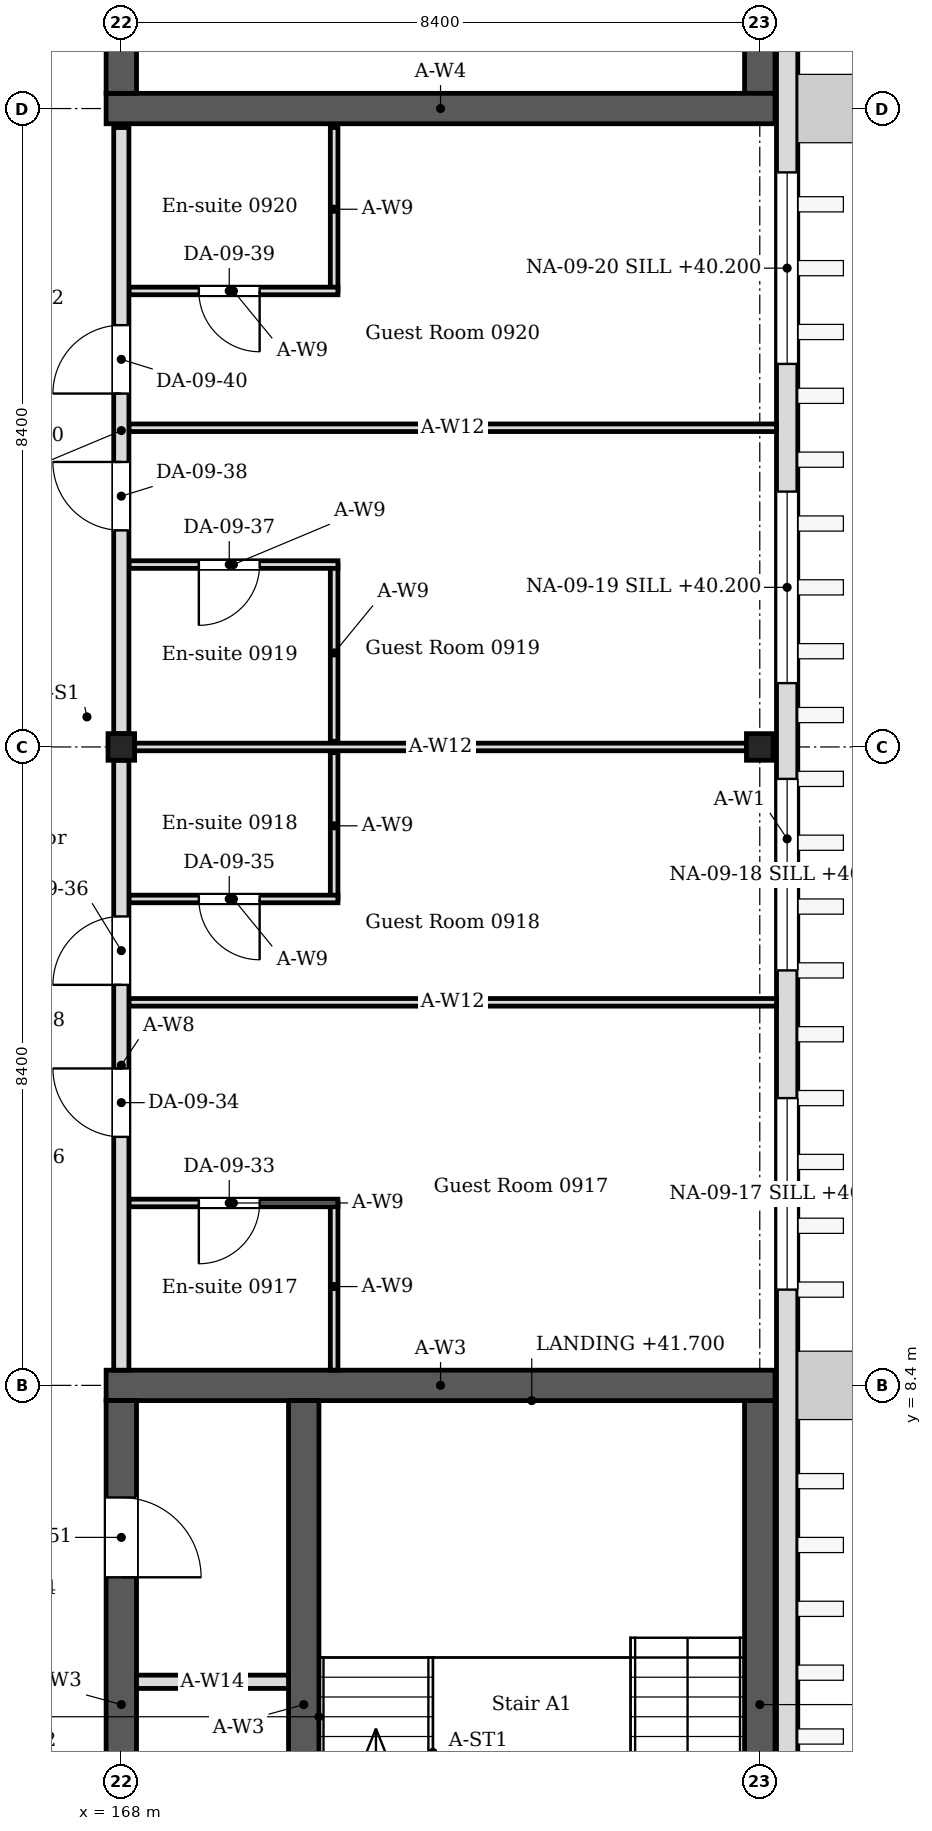
"""IFC4 building model, lengths in metres.
Left out: names, types, materials, properties, quantities, classifications, styles, units other than length and angle.
Written with IfcOpenShell. Run it as: python <this file> out.ifc"""

import sys

from ifc_helpers import new_model, si_unit, direction, frame, frame_2d, origin, origin_2d, place, context, subcontext, project, spatial, rectangle, i_section, extrude, element, fill, save


model = new_model("IFC4")
c1 = context("Model", 3, precision=1e-05, world=origin(), true_north=direction((0.0, 1.0)))
c2 = subcontext(c1, "Body", "Model", "MODEL_VIEW")
j1 = project(units=[si_unit("LENGTHUNIT", "METRE"), si_unit("PLANEANGLEUNIT", "RADIAN")], contexts=[c1])
p1 = place(None, origin())
s1 = spatial("IfcSite", under=j1, at=p1, CompositionType="ELEMENT")
p2 = place(p1, origin())
s2 = spatial("IfcBuilding", under=s1, at=p2, CompositionType="ELEMENT")
p3 = place(p2, frame((0.0, 0.0, 39.6)))
s3 = spatial("IfcBuildingStorey", under=s2, at=p3, CompositionType="ELEMENT", Elevation=39.6)
for number, where, z_axis, x_axis in (
    (1, (168.0, 16.8, 0.0), (0.0, 0.0, 1.0), (1.0, 0.0, 0.0)),
    (2, (176.4, 16.8, 0.0), (0.0, 0.0, 1.0), (1.0, 0.0, 0.0)),
):
    element("IfcColumn", number, at=place(p3, frame(where, z_axis=z_axis, x_axis=x_axis)), inside=s3, PredefinedType="COLUMN", context=c2, shape_type="SweptSolid", body=[
        extrude(i_section(OverallWidth=0.35, OverallDepth=0.35, WebThickness=0.012, FlangeThickness=0.019, FilletRadius=0.013, at=origin_2d()), origin(), (0.0, 0.0, 1.0), 4.2),
    ])
p4 = place(p3, frame((167.8, 8.4, 0.0), z_axis=(0.0, 0.0, 1.0), x_axis=(1.0, 0.0, 0.0)))
e3 = element("IfcWall", 3, at=p4, inside=s3, PredefinedType="SOLIDWALL", context=c2, shape_type="SweptSolid", body=[
    extrude(rectangle(XDim=8.8, YDim=0.4, at=frame_2d((4.4, 0.0))), origin(), (0.0, 0.0, 1.0), 4.05),
])
p5 = place(p3, frame((168.0, 0.2, 0.0), z_axis=(0.0, 0.0, 1.0), x_axis=(0.0, 1.0, 0.0)))
e4 = element("IfcWall", 4, at=p5, inside=s3, PredefinedType="SOLIDWALL", context=c2, shape_type="SweptSolid", body=[
    extrude(rectangle(XDim=8.0, YDim=0.4, at=frame_2d((4.0, 0.0))), origin(), (0.0, 0.0, 1.0), 4.05),
])
p6 = place(p5, frame((1.75, 0.0, 0.0)))
e5 = element("IfcOpeningElement", 5, at=p6, cuts=e4, PredefinedType="OPENING", context=c2, shape_type="SweptSolid", body=[
    extrude(rectangle(XDim=1.0, YDim=2.1, at=frame_2d((0.5, 1.05))), frame((0.0, 0.21, 0.0), z_axis=(0.0, -1.0, 0.0), x_axis=(1.0, 0.0, 0.0)), (0.0, 0.0, 1.0), 0.42),
])
p7 = place(p5, frame((5.675, 0.0, 0.0)))
e6 = element("IfcOpeningElement", 6, at=p7, cuts=e4, PredefinedType="OPENING", context=c2, shape_type="SweptSolid", body=[
    extrude(rectangle(XDim=1.05, YDim=2.1, at=frame_2d((0.525, 1.05))), frame((0.0, 0.21, 0.0), z_axis=(0.0, -1.0, 0.0), x_axis=(1.0, 0.0, 0.0)), (0.0, 0.0, 1.0), 0.42),
])
p8 = place(p3, frame((176.4, 0.2, 0.0), z_axis=(0.0, 0.0, 1.0), x_axis=(0.0, 1.0, 0.0)))
e7 = element("IfcWall", 7, at=p8, inside=s3, PredefinedType="SOLIDWALL", context=c2, shape_type="SweptSolid", body=[
    extrude(rectangle(XDim=8.0, YDim=0.4, at=frame_2d((4.0, 0.0))), origin(), (0.0, 0.0, 1.0), 4.05),
])
p9 = place(p3, frame((167.8, 25.2, 0.0), z_axis=(0.0, 0.0, 1.0), x_axis=(1.0, 0.0, 0.0)))
e8 = element("IfcWall", 8, at=p9, inside=s3, PredefinedType="SOLIDWALL", context=c2, shape_type="SweptSolid", body=[
    extrude(rectangle(XDim=8.8, YDim=0.4, at=frame_2d((4.4, 0.0))), origin(), (0.0, 0.0, 1.0), 4.05),
])
p10 = place(p3, frame((168.0, 25.4, 0.0), z_axis=(0.0, 0.0, 1.0), x_axis=(0.0, 1.0, 0.0)))
e9 = element("IfcWall", 9, at=p10, inside=s3, PredefinedType="SOLIDWALL", context=c2, shape_type="SweptSolid", body=[
    extrude(rectangle(XDim=16.4, YDim=0.4, at=frame_2d((8.2, 0.0))), origin(), (0.0, 0.0, 1.0), 4.05),
])
p11 = place(p10, frame((1.0, 0.0, 0.0)))
e10 = element("IfcOpeningElement", 10, at=p11, cuts=e9, PredefinedType="OPENING", context=c2, shape_type="SweptSolid", body=[
    extrude(rectangle(XDim=1.0, YDim=2.1, at=frame_2d((0.5, 1.05))), frame((0.0, 0.21, 0.0), z_axis=(0.0, -1.0, 0.0), x_axis=(1.0, 0.0, 0.0)), (0.0, 0.0, 1.0), 0.42),
])
p12 = place(p10, frame((14.4, 0.0, 0.0)))
e11 = element("IfcOpeningElement", 11, at=p12, cuts=e9, PredefinedType="OPENING", context=c2, shape_type="SweptSolid", body=[
    extrude(rectangle(XDim=1.4, YDim=2.1, at=frame_2d((0.7, 1.05))), frame((0.0, 0.21, 0.0), z_axis=(0.0, -1.0, 0.0), x_axis=(1.0, 0.0, 0.0)), (0.0, 0.0, 1.0), 0.42),
])
p13 = place(p3, frame((176.4, 25.4, 0.0), z_axis=(0.0, 0.0, 1.0), x_axis=(0.0, 1.0, 0.0)))
e12 = element("IfcWall", 12, at=p13, inside=s3, PredefinedType="SOLIDWALL", context=c2, shape_type="SweptSolid", body=[
    extrude(rectangle(XDim=16.4, YDim=0.4, at=frame_2d((8.2, 0.0))), origin(), (0.0, 0.0, 1.0), 4.05),
])
p14 = place(p3, frame((176.76, -0.22, 0.0), z_axis=(0.0, 0.0, 1.0), x_axis=(0.0, 1.0, 0.0)))
e13 = element("IfcWall", 13, at=p14, inside=s3, PredefinedType="SOLIDWALL", context=c2, shape_type="SweptSolid", body=[
    extrude(rectangle(XDim=42.57, YDim=0.28, at=frame_2d((21.285, 0.0))), origin(), (0.0, 0.0, 1.0), 4.05),
])
p15 = place(p14, frame((9.88, 0.0, 0.6)))
e14 = element("IfcOpeningElement", 14, at=p15, cuts=e13, PredefinedType="OPENING", context=c2, shape_type="SweptSolid", body=[
    extrude(rectangle(XDim=2.52, YDim=2.4, at=frame_2d((1.26, 1.2))), frame((0.0, 0.15, 0.0), z_axis=(0.0, -1.0, 0.0), x_axis=(1.0, 0.0, 0.0)), (0.0, 0.0, 1.0), 0.3),
])
p16 = place(p14, frame((14.08, 0.0, 0.6)))
e15 = element("IfcOpeningElement", 15, at=p16, cuts=e13, PredefinedType="OPENING", context=c2, shape_type="SweptSolid", body=[
    extrude(rectangle(XDim=2.52, YDim=2.4, at=frame_2d((1.26, 1.2))), frame((0.0, 0.15, 0.0), z_axis=(0.0, -1.0, 0.0), x_axis=(1.0, 0.0, 0.0)), (0.0, 0.0, 1.0), 0.3),
])
p17 = place(p14, frame((17.86, 0.0, 0.6)))
e16 = element("IfcOpeningElement", 16, at=p17, cuts=e13, PredefinedType="OPENING", context=c2, shape_type="SweptSolid", body=[
    extrude(rectangle(XDim=2.52, YDim=2.4, at=frame_2d((1.26, 1.2))), frame((0.0, 0.15, 0.0), z_axis=(0.0, -1.0, 0.0), x_axis=(1.0, 0.0, 0.0)), (0.0, 0.0, 1.0), 0.3),
])
p18 = place(p14, frame((22.06, 0.0, 0.6)))
e17 = element("IfcOpeningElement", 17, at=p18, cuts=e13, PredefinedType="OPENING", context=c2, shape_type="SweptSolid", body=[
    extrude(rectangle(XDim=2.52, YDim=2.4, at=frame_2d((1.26, 1.2))), frame((0.0, 0.15, 0.0), z_axis=(0.0, -1.0, 0.0), x_axis=(1.0, 0.0, 0.0)), (0.0, 0.0, 1.0), 0.3),
])
p19 = place(p3, frame((170.8, 8.6, 0.0), z_axis=(0.0, 0.0, 1.0), x_axis=(0.0, 1.0, 0.0)))
e18 = element("IfcWall", 18, at=p19, inside=s3, PredefinedType="PARTITIONING", context=c2, shape_type="SweptSolid", body=[
    extrude(rectangle(XDim=2.2, YDim=0.1, at=frame_2d((1.1, 0.0))), origin(), (0.0, 0.0, 1.0), 4.05),
])
p20 = place(p3, frame((170.85, 10.8, 0.0), z_axis=(0.0, 0.0, 1.0), x_axis=(-1.0, 0.0, 0.0)))
e19 = element("IfcWall", 19, at=p20, inside=s3, PredefinedType="PARTITIONING", context=c2, shape_type="SweptSolid", body=[
    extrude(rectangle(XDim=2.75, YDim=0.1, at=frame_2d((1.375, 0.0))), origin(), (0.0, 0.0, 1.0), 4.05),
])
p21 = place(p20, frame((1.03, 0.0, 0.0)))
e20 = element("IfcOpeningElement", 20, at=p21, cuts=e19, PredefinedType="OPENING", context=c2, shape_type="SweptSolid", body=[
    extrude(rectangle(XDim=0.8, YDim=2.1, at=frame_2d((0.4, 1.05))), frame((0.0, 0.06, 0.0), z_axis=(0.0, -1.0, 0.0), x_axis=(1.0, 0.0, 0.0)), (0.0, 0.0, 1.0), 0.12),
])
p22 = place(p3, frame((170.8, 14.8, 0.0), z_axis=(0.0, 0.0, 1.0), x_axis=(0.0, 1.0, 0.0)))
e21 = element("IfcWall", 21, at=p22, inside=s3, PredefinedType="PARTITIONING", context=c2, shape_type="SweptSolid", body=[
    extrude(rectangle(XDim=1.925, YDim=0.1, at=frame_2d((0.962, 0.0))), origin(), (0.0, 0.0, 1.0), 4.05),
])
p23 = place(p3, frame((170.85, 14.8, 0.0), z_axis=(0.0, 0.0, 1.0), x_axis=(-1.0, 0.0, 0.0)))
e22 = element("IfcWall", 22, at=p23, inside=s3, PredefinedType="PARTITIONING", context=c2, shape_type="SweptSolid", body=[
    extrude(rectangle(XDim=2.75, YDim=0.1, at=frame_2d((1.375, 0.0))), origin(), (0.0, 0.0, 1.0), 4.05),
])
p24 = place(p23, frame((1.03, 0.0, 0.0)))
e23 = element("IfcOpeningElement", 23, at=p24, cuts=e22, PredefinedType="OPENING", context=c2, shape_type="SweptSolid", body=[
    extrude(rectangle(XDim=0.8, YDim=2.1, at=frame_2d((0.4, 1.05))), frame((0.0, 0.06, 0.0), z_axis=(0.0, -1.0, 0.0), x_axis=(1.0, 0.0, 0.0)), (0.0, 0.0, 1.0), 0.12),
])
p25 = place(p3, frame((170.8, 16.875, 0.0), z_axis=(0.0, 0.0, 1.0), x_axis=(0.0, 1.0, 0.0)))
e24 = element("IfcWall", 24, at=p25, inside=s3, PredefinedType="PARTITIONING", context=c2, shape_type="SweptSolid", body=[
    extrude(rectangle(XDim=2.325, YDim=0.1, at=frame_2d((1.163, 0.0))), origin(), (0.0, 0.0, 1.0), 4.05),
])
p26 = place(p3, frame((170.85, 19.2, 0.0), z_axis=(0.0, 0.0, 1.0), x_axis=(-1.0, 0.0, 0.0)))
e25 = element("IfcWall", 25, at=p26, inside=s3, PredefinedType="PARTITIONING", context=c2, shape_type="SweptSolid", body=[
    extrude(rectangle(XDim=2.75, YDim=0.1, at=frame_2d((1.375, 0.0))), origin(), (0.0, 0.0, 1.0), 4.05),
])
p27 = place(p26, frame((1.03, 0.0, 0.0)))
e26 = element("IfcOpeningElement", 26, at=p27, cuts=e25, PredefinedType="OPENING", context=c2, shape_type="SweptSolid", body=[
    extrude(rectangle(XDim=0.8, YDim=2.1, at=frame_2d((0.4, 1.05))), frame((0.0, 0.06, 0.0), z_axis=(0.0, -1.0, 0.0), x_axis=(1.0, 0.0, 0.0)), (0.0, 0.0, 1.0), 0.12),
])
p28 = place(p3, frame((170.8, 22.8, 0.0), z_axis=(0.0, 0.0, 1.0), x_axis=(0.0, 1.0, 0.0)))
e27 = element("IfcWall", 27, at=p28, inside=s3, PredefinedType="PARTITIONING", context=c2, shape_type="SweptSolid", body=[
    extrude(rectangle(XDim=2.15, YDim=0.1, at=frame_2d((1.075, 0.0))), origin(), (0.0, 0.0, 1.0), 4.05),
])
p29 = place(p3, frame((170.85, 22.8, 0.0), z_axis=(0.0, 0.0, 1.0), x_axis=(-1.0, 0.0, 0.0)))
e28 = element("IfcWall", 28, at=p29, inside=s3, PredefinedType="PARTITIONING", context=c2, shape_type="SweptSolid", body=[
    extrude(rectangle(XDim=2.75, YDim=0.1, at=frame_2d((1.375, 0.0))), origin(), (0.0, 0.0, 1.0), 4.05),
])
p30 = place(p29, frame((1.03, 0.0, 0.0)))
e29 = element("IfcOpeningElement", 29, at=p30, cuts=e28, PredefinedType="OPENING", context=c2, shape_type="SweptSolid", body=[
    extrude(rectangle(XDim=0.8, YDim=2.1, at=frame_2d((0.4, 1.05))), frame((0.0, 0.06, 0.0), z_axis=(0.0, -1.0, 0.0), x_axis=(1.0, 0.0, 0.0)), (0.0, 0.0, 1.0), 0.12),
])
p31 = place(p3, frame((168.175, 16.8, 0.0), z_axis=(0.0, 0.0, 1.0), x_axis=(1.0, 0.0, 0.0)))
e30 = element("IfcWall", 30, at=p31, inside=s3, PredefinedType="PARTITIONING", context=c2, shape_type="SweptSolid", body=[
    extrude(rectangle(XDim=8.05, YDim=0.1, at=frame_2d((4.025, 0.0))), origin(), (0.0, 0.0, 1.0), 3.604),
])
for number, where, z_axis, x_axis in (
    (31, (168.1, 13.44, 0.0), (0.0, 0.0, 1.0), (1.0, 0.0, 0.0)),
    (32, (168.1, 21.0, 0.0), (0.0, 0.0, 1.0), (1.0, 0.0, 0.0)),
):
    element("IfcWall", number, at=place(p3, frame(where, z_axis=z_axis, x_axis=x_axis)), inside=s3, PredefinedType="PARTITIONING", context=c2, shape_type="SweptSolid", body=[
        extrude(rectangle(XDim=8.52, YDim=0.1, at=frame_2d((4.26, 0.0))), origin(), (0.0, 0.0, 1.0), 3.604),
    ])
p32 = place(p3, frame((168.0, 8.6, 0.0), z_axis=(0.0, 0.0, 1.0), x_axis=(0.0, 1.0, 0.0)))
e33 = element("IfcWall", 33, at=p32, inside=s3, PredefinedType="PARTITIONING", context=c2, shape_type="SweptSolid", body=[
    extrude(rectangle(XDim=8.025, YDim=0.2, at=frame_2d((4.012, 0.0))), origin(), (0.0, 0.0, 1.0), 3.45),
])
p33 = place(p32, frame((3.07, 0.0, 0.0)))
e34 = element("IfcOpeningElement", 34, at=p33, cuts=e33, PredefinedType="OPENING", context=c2, shape_type="SweptSolid", body=[
    extrude(rectangle(XDim=0.9, YDim=2.1, at=frame_2d((0.45, 1.05))), frame((0.0, 0.11, 0.0), z_axis=(0.0, -1.0, 0.0), x_axis=(1.0, 0.0, 0.0)), (0.0, 0.0, 1.0), 0.22),
])
p34 = place(p32, frame((5.07, 0.0, 0.0)))
e35 = element("IfcOpeningElement", 35, at=p34, cuts=e33, PredefinedType="OPENING", context=c2, shape_type="SweptSolid", body=[
    extrude(rectangle(XDim=0.9, YDim=2.1, at=frame_2d((0.45, 1.05))), frame((0.0, 0.11, 0.0), z_axis=(0.0, -1.0, 0.0), x_axis=(1.0, 0.0, 0.0)), (0.0, 0.0, 1.0), 0.22),
])
p35 = place(p3, frame((168.0, 16.975, 0.0), z_axis=(0.0, 0.0, 1.0), x_axis=(0.0, 1.0, 0.0)))
e36 = element("IfcWall", 36, at=p35, inside=s3, PredefinedType="PARTITIONING", context=c2, shape_type="SweptSolid", body=[
    extrude(rectangle(XDim=7.975, YDim=0.2, at=frame_2d((3.987, 0.0))), origin(), (0.0, 0.0, 1.0), 3.45),
])
p36 = place(p35, frame((2.675, 0.0, 0.0)))
e37 = element("IfcOpeningElement", 37, at=p36, cuts=e36, PredefinedType="OPENING", context=c2, shape_type="SweptSolid", body=[
    extrude(rectangle(XDim=0.9, YDim=2.1, at=frame_2d((0.45, 1.05))), frame((0.0, 0.11, 0.0), z_axis=(0.0, -1.0, 0.0), x_axis=(1.0, 0.0, 0.0)), (0.0, 0.0, 1.0), 0.22),
])
p37 = place(p35, frame((4.475, 0.0, 0.0)))
e38 = element("IfcOpeningElement", 38, at=p37, cuts=e36, PredefinedType="OPENING", context=c2, shape_type="SweptSolid", body=[
    extrude(rectangle(XDim=0.9, YDim=2.1, at=frame_2d((0.45, 1.05))), frame((0.0, 0.11, 0.0), z_axis=(0.0, -1.0, 0.0), x_axis=(1.0, 0.0, 0.0)), (0.0, 0.0, 1.0), 0.22),
])
p38 = place(p3, frame((170.4, 0.2, 0.0), z_axis=(0.0, 0.0, 1.0), x_axis=(0.0, 1.0, 0.0)))
e39 = element("IfcWall", 39, at=p38, inside=s3, PredefinedType="SOLIDWALL", context=c2, shape_type="SweptSolid", body=[
    extrude(rectangle(XDim=8.0, YDim=0.4, at=frame_2d((4.0, 0.0))), origin(), (0.0, 0.0, 1.0), 4.05),
])
p39 = place(p38, frame((0.3, 0.0, 0.0)))
e40 = element("IfcOpeningElement", 40, at=p39, cuts=e39, PredefinedType="OPENING", context=c2, shape_type="SweptSolid", body=[
    extrude(rectangle(XDim=0.9, YDim=2.1, at=frame_2d((0.45, 1.05))), frame((0.0, 0.21, 0.0), z_axis=(0.0, -1.0, 0.0), x_axis=(1.0, 0.0, 0.0)), (0.0, 0.0, 1.0), 0.42),
])
p40 = place(p3, frame((168.2, 4.5, 0.0), z_axis=(0.0, 0.0, 1.0), x_axis=(1.0, 0.0, 0.0)))
e41 = element("IfcWall", 41, at=p40, inside=s3, PredefinedType="PARTITIONING", context=c2, shape_type="SweptSolid", body=[
    extrude(rectangle(XDim=2.0, YDim=0.175, at=frame_2d((1.0, 0.0))), origin(), (0.0, 0.0, 1.0), 4.05),
])
p41 = place(p15, origin())
e42 = element("IfcWindow", 42, at=p41, inside=s3, PartitioningType="SINGLE_PANEL", PredefinedType="WINDOW", context=c2, shape_type="SweptSolid", body=[
    extrude(rectangle(XDim=2.52, YDim=2.4, at=frame_2d((1.26, 1.2))), frame((0.0, 0.03, 0.0), z_axis=(0.0, -1.0, 0.0), x_axis=(1.0, 0.0, 0.0)), (0.0, 0.0, 1.0), 0.06),
])
fill(e14, e42)
p42 = place(p16, origin())
e43 = element("IfcWindow", 43, at=p42, inside=s3, PartitioningType="SINGLE_PANEL", PredefinedType="WINDOW", context=c2, shape_type="SweptSolid", body=[
    extrude(rectangle(XDim=2.52, YDim=2.4, at=frame_2d((1.26, 1.2))), frame((0.0, 0.03, 0.0), z_axis=(0.0, -1.0, 0.0), x_axis=(1.0, 0.0, 0.0)), (0.0, 0.0, 1.0), 0.06),
])
fill(e15, e43)
p43 = place(p17, origin())
e44 = element("IfcWindow", 44, at=p43, inside=s3, PartitioningType="SINGLE_PANEL", PredefinedType="WINDOW", context=c2, shape_type="SweptSolid", body=[
    extrude(rectangle(XDim=2.52, YDim=2.4, at=frame_2d((1.26, 1.2))), frame((0.0, 0.03, 0.0), z_axis=(0.0, -1.0, 0.0), x_axis=(1.0, 0.0, 0.0)), (0.0, 0.0, 1.0), 0.06),
])
fill(e16, e44)
p44 = place(p18, origin())
e45 = element("IfcWindow", 45, at=p44, inside=s3, PartitioningType="SINGLE_PANEL", PredefinedType="WINDOW", context=c2, shape_type="SweptSolid", body=[
    extrude(rectangle(XDim=2.52, YDim=2.4, at=frame_2d((1.26, 1.2))), frame((0.0, 0.03, 0.0), z_axis=(0.0, -1.0, 0.0), x_axis=(1.0, 0.0, 0.0)), (0.0, 0.0, 1.0), 0.06),
])
fill(e17, e45)
p45 = place(p21, origin())
e46 = element("IfcDoor", 46, at=p45, inside=s3, OperationType="SINGLE_SWING_RIGHT", PredefinedType="DOOR", context=c2, shape_type="SweptSolid", body=[
    extrude(rectangle(XDim=0.8, YDim=2.1, at=frame_2d((0.4, 1.05))), frame((0.0, 0.025, 0.0), z_axis=(0.0, -1.0, 0.0), x_axis=(1.0, 0.0, 0.0)), (0.0, 0.0, 1.0), 0.05),
])
fill(e20, e46)
p46 = place(p33, origin())
e47 = element("IfcDoor", 47, at=p46, inside=s3, OperationType="SINGLE_SWING_RIGHT", PredefinedType="DOOR", context=c2, shape_type="SweptSolid", body=[
    extrude(rectangle(XDim=0.9, YDim=2.1, at=frame_2d((0.45, 1.05))), frame((0.0, 0.025, 0.0), z_axis=(0.0, -1.0, 0.0), x_axis=(1.0, 0.0, 0.0)), (0.0, 0.0, 1.0), 0.05),
])
fill(e34, e47)
p47 = place(p24, origin())
e48 = element("IfcDoor", 48, at=p47, inside=s3, OperationType="SINGLE_SWING_LEFT", PredefinedType="DOOR", context=c2, shape_type="SweptSolid", body=[
    extrude(rectangle(XDim=0.8, YDim=2.1, at=frame_2d((0.4, 1.05))), frame((0.0, 0.025, 0.0), z_axis=(0.0, -1.0, 0.0), x_axis=(1.0, 0.0, 0.0)), (0.0, 0.0, 1.0), 0.05),
])
fill(e23, e48)
p48 = place(p34, origin())
e49 = element("IfcDoor", 49, at=p48, inside=s3, OperationType="SINGLE_SWING_LEFT", PredefinedType="DOOR", context=c2, shape_type="SweptSolid", body=[
    extrude(rectangle(XDim=0.9, YDim=2.1, at=frame_2d((0.45, 1.05))), frame((0.0, 0.025, 0.0), z_axis=(0.0, -1.0, 0.0), x_axis=(1.0, 0.0, 0.0)), (0.0, 0.0, 1.0), 0.05),
])
fill(e35, e49)
p49 = place(p27, origin())
e50 = element("IfcDoor", 50, at=p49, inside=s3, OperationType="SINGLE_SWING_RIGHT", PredefinedType="DOOR", context=c2, shape_type="SweptSolid", body=[
    extrude(rectangle(XDim=0.8, YDim=2.1, at=frame_2d((0.4, 1.05))), frame((0.0, 0.025, 0.0), z_axis=(0.0, -1.0, 0.0), x_axis=(1.0, 0.0, 0.0)), (0.0, 0.0, 1.0), 0.05),
])
fill(e26, e50)
p50 = place(p36, origin())
e51 = element("IfcDoor", 51, at=p50, inside=s3, OperationType="SINGLE_SWING_RIGHT", PredefinedType="DOOR", context=c2, shape_type="SweptSolid", body=[
    extrude(rectangle(XDim=0.9, YDim=2.1, at=frame_2d((0.45, 1.05))), frame((0.0, 0.025, 0.0), z_axis=(0.0, -1.0, 0.0), x_axis=(1.0, 0.0, 0.0)), (0.0, 0.0, 1.0), 0.05),
])
fill(e37, e51)
p51 = place(p30, origin())
e52 = element("IfcDoor", 52, at=p51, inside=s3, OperationType="SINGLE_SWING_LEFT", PredefinedType="DOOR", context=c2, shape_type="SweptSolid", body=[
    extrude(rectangle(XDim=0.8, YDim=2.1, at=frame_2d((0.4, 1.05))), frame((0.0, 0.025, 0.0), z_axis=(0.0, -1.0, 0.0), x_axis=(1.0, 0.0, 0.0)), (0.0, 0.0, 1.0), 0.05),
])
fill(e29, e52)
p52 = place(p37, origin())
e53 = element("IfcDoor", 53, at=p52, inside=s3, OperationType="SINGLE_SWING_LEFT", PredefinedType="DOOR", context=c2, shape_type="SweptSolid", body=[
    extrude(rectangle(XDim=0.9, YDim=2.1, at=frame_2d((0.45, 1.05))), frame((0.0, 0.025, 0.0), z_axis=(0.0, -1.0, 0.0), x_axis=(1.0, 0.0, 0.0)), (0.0, 0.0, 1.0), 0.05),
])
fill(e38, e53)
p53 = place(p7, origin())
e54 = element("IfcDoor", 54, at=p53, inside=s3, OperationType="SINGLE_SWING_LEFT", PredefinedType="DOOR", context=c2, shape_type="SweptSolid", body=[
    extrude(rectangle(XDim=1.05, YDim=2.1, at=frame_2d((0.525, 1.05))), frame((0.0, 0.025, 0.0), z_axis=(0.0, -1.0, 0.0), x_axis=(1.0, 0.0, 0.0)), (0.0, 0.0, 1.0), 0.05),
])
fill(e6, e54)
save(model, sys.argv[1])
